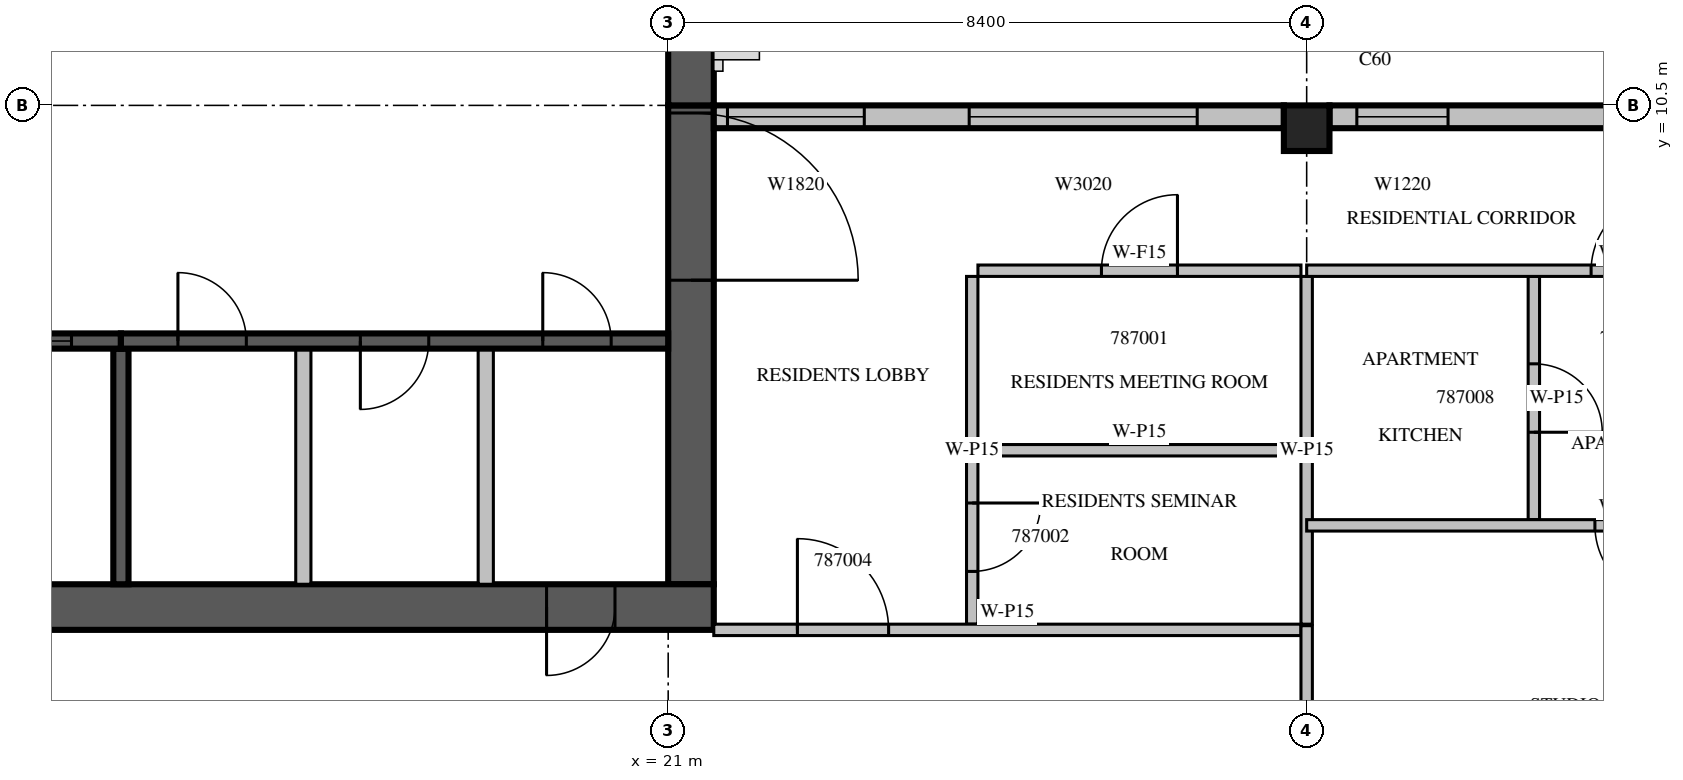
"""IFC4 building model, lengths in metres.
Left out: names, types, materials, properties, quantities, classifications, styles, units other than length and angle.
Written with IfcOpenShell. Run it as: python <this file> out.ifc"""

import sys

from ifc_helpers import new_model, si_unit, direction, frame, frame_2d, origin, origin_2d, place, context, subcontext, project, spatial, rectangle, extrude, source, transform, mapped, element, fill, save


model = new_model("IFC4")
c1 = context("Model", 3, precision=1e-05, world=origin(), true_north=direction((0.0, 1.0)))
c2 = subcontext(c1, "Body", "Model", "MODEL_VIEW")
j1 = project(units=[si_unit("LENGTHUNIT", "METRE"), si_unit("PLANEANGLEUNIT", "RADIAN")], contexts=[c1])
p1 = place(None, origin())
s1 = spatial("IfcSite", under=j1, at=p1, CompositionType="ELEMENT")
p2 = place(p1, origin())
s2 = spatial("IfcBuilding", under=s1, at=p2, CompositionType="ELEMENT")
p3 = place(p2, frame((0.0, 0.0, 365.0)))
s3 = spatial("IfcBuildingStorey", under=s2, at=p3, CompositionType="ELEMENT", Elevation=365.0)
m1 = source(origin(), c2, "Body", "SweptSolid", [
    extrude(rectangle(XDim=0.6, YDim=0.6, at=origin_2d()), origin(), (0.0, 0.0, 1.0), 3.5),
])
p4 = place(p3, frame((29.4, 10.2, 0.0), z_axis=(0.0, 0.0, 1.0), x_axis=(1.0, 0.0, 0.0)))
e1 = element("IfcColumn", 1, at=p4, inside=s3, PredefinedType="COLUMN", context=c2, shape_type="MappedRepresentation", body=[
    mapped(m1, transform((0.0, 0.0, 0.0), scale=1.0)),
])
m2 = source(origin(), c2, "Body", "SweptSolid", [
    extrude(rectangle(XDim=6.3, YDim=0.6, at=frame_2d((3.15, 0.0))), origin(), (0.0, 0.0, 1.0), 3.5),
])
p5 = place(p3, frame((21.3, 4.2, 0.0), z_axis=(0.0, 0.0, 1.0), x_axis=(0.0, 1.0, 0.0)))
e2 = element("IfcWall", 2, at=p5, inside=s3, PredefinedType="SHEAR", context=c2, shape_type="MappedRepresentation", body=[
    mapped(m2, transform((0.0, 0.0, 0.0), scale=1.0)),
])
m3 = source(origin(), c2, "Body", "SweptSolid", [
    extrude(rectangle(XDim=2.2, YDim=2.1, at=frame_2d((1.1, 1.05))), frame((0.0, 0.31, 0.0), z_axis=(0.0, -1.0, 0.0), x_axis=(1.0, 0.0, 0.0)), (0.0, 0.0, 1.0), 0.62),
])
p6 = place(p5, frame((4.0, 0.0, 0.0)))
e3 = element("IfcOpeningElement", 3, at=p6, cuts=e2, PredefinedType="OPENING", context=c2, shape_type="MappedRepresentation", body=[
    mapped(m3, transform((0.0, 0.0, 0.0), scale=1.0)),
])
m4 = source(origin(), c2, "Body", "SweptSolid", [
    extrude(rectangle(XDim=17.4, YDim=0.6, at=frame_2d((8.7, 0.0))), origin(), (0.0, 0.0, 1.0), 3.5),
])
p7 = place(p3, frame((4.2, 3.9, 0.0), z_axis=(0.0, 0.0, 1.0), x_axis=(1.0, 0.0, 0.0)))
e4 = element("IfcWall", 4, at=p7, inside=s3, PredefinedType="SHEAR", context=c2, shape_type="MappedRepresentation", body=[
    mapped(m4, transform((0.0, 0.0, 0.0), scale=1.0)),
])
m5 = source(origin(), c2, "Body", "SweptSolid", [
    extrude(rectangle(XDim=0.9, YDim=2.1, at=frame_2d((0.45, 1.05))), frame((0.0, 0.31, 0.0), z_axis=(0.0, -1.0, 0.0), x_axis=(1.0, 0.0, 0.0)), (0.0, 0.0, 1.0), 0.62),
])
p8 = place(p7, frame((15.2, 0.0, 0.0)))
e5 = element("IfcOpeningElement", 5, at=p8, cuts=e4, PredefinedType="OPENING", context=c2, shape_type="MappedRepresentation", body=[
    mapped(m5, transform((0.0, 0.0, 0.0), scale=1.0)),
])
m6 = source(origin(), c2, "Body", "SweptSolid", [
    extrude(rectangle(XDim=10.5, YDim=0.6, at=frame_2d((5.25, 0.0))), origin(), (0.0, 0.0, 1.0), 3.5),
])
p9 = place(p3, frame((21.3, 10.5, 0.0), z_axis=(0.0, 0.0, 1.0), x_axis=(0.0, 1.0, 0.0)))
e6 = element("IfcWall", 6, at=p9, inside=s3, PredefinedType="SHEAR", context=c2, shape_type="MappedRepresentation", body=[
    mapped(m6, transform((0.0, 0.0, 0.0), scale=1.0)),
])
m7 = source(origin(), c2, "Body", "SweptSolid", [
    extrude(rectangle(XDim=1.2, YDim=2.4, at=frame_2d((0.6, 1.2))), frame((0.0, 0.31, 0.0), z_axis=(0.0, -1.0, 0.0), x_axis=(1.0, 0.0, 0.0)), (0.0, 0.0, 1.0), 0.62),
])
p10 = place(p9, frame((5.7, 0.0, 0.6)))
e7 = element("IfcOpeningElement", 7, at=p10, cuts=e6, PredefinedType="OPENING", context=c2, shape_type="MappedRepresentation", body=[
    mapped(m7, transform((0.0, 0.0, 0.0), scale=1.0)),
])
m8 = source(origin(), c2, "Body", "SweptSolid", [
    extrude(rectangle(XDim=7.8, YDim=0.3, at=frame_2d((3.9, 0.0))), origin(), (0.0, 0.0, 1.0), 3.05),
])
p11 = place(p3, frame((37.5, 10.35, 0.0), z_axis=(0.0, 0.0, 1.0), x_axis=(-1.0, 0.0, 0.0)))
e8 = element("IfcWall", 8, at=p11, inside=s3, PredefinedType="STANDARD", context=c2, shape_type="MappedRepresentation", body=[
    mapped(m8, transform((0.0, 0.0, 0.0), scale=1.0)),
])
m9 = source(origin(), c2, "Body", "SweptSolid", [
    extrude(rectangle(XDim=3.0, YDim=2.0, at=frame_2d((1.5, 1.0))), frame((0.0, 0.16, 0.0), z_axis=(0.0, -1.0, 0.0), x_axis=(1.0, 0.0, 0.0)), (0.0, 0.0, 1.0), 0.32),
])
p12 = place(p11, frame((1.14, 0.0, 0.6)))
e9 = element("IfcOpeningElement", 9, at=p12, cuts=e8, PredefinedType="OPENING", context=c2, shape_type="MappedRepresentation", body=[
    mapped(m9, transform((0.0, 0.0, 0.0), scale=1.0)),
])
m10 = source(origin(), c2, "Body", "SweptSolid", [
    extrude(rectangle(XDim=1.2, YDim=2.0, at=frame_2d((0.6, 1.0))), frame((0.0, 0.16, 0.0), z_axis=(0.0, -1.0, 0.0), x_axis=(1.0, 0.0, 0.0)), (0.0, 0.0, 1.0), 0.32),
])
p13 = place(p11, frame((6.24, 0.0, 0.6)))
e10 = element("IfcOpeningElement", 10, at=p13, cuts=e8, PredefinedType="OPENING", context=c2, shape_type="MappedRepresentation", body=[
    mapped(m10, transform((0.0, 0.0, 0.0), scale=1.0)),
])
p14 = place(p3, frame((29.1, 10.35, 0.0), z_axis=(0.0, 0.0, 1.0), x_axis=(-1.0, 0.0, 0.0)))
e11 = element("IfcWall", 11, at=p14, inside=s3, PredefinedType="STANDARD", context=c2, shape_type="SweptSolid", body=[
    extrude(rectangle(XDim=7.5, YDim=0.3, at=frame_2d((3.75, 0.0))), origin(), (0.0, 0.0, 1.0), 3.05),
])
p15 = place(p14, frame((1.14, 0.0, 0.6)))
e12 = element("IfcOpeningElement", 12, at=p15, cuts=e11, PredefinedType="OPENING", context=c2, shape_type="MappedRepresentation", body=[
    mapped(m9, transform((0.0, 0.0, 0.0), scale=1.0)),
])
m11 = source(origin(), c2, "Body", "SweptSolid", [
    extrude(rectangle(XDim=1.8, YDim=2.0, at=frame_2d((0.9, 1.0))), frame((0.0, 0.16, 0.0), z_axis=(0.0, -1.0, 0.0), x_axis=(1.0, 0.0, 0.0)), (0.0, 0.0, 1.0), 0.32),
])
p16 = place(p14, frame((5.52, 0.0, 0.6)))
e13 = element("IfcOpeningElement", 13, at=p16, cuts=e11, PredefinedType="OPENING", context=c2, shape_type="MappedRepresentation", body=[
    mapped(m11, transform((0.0, 0.0, 0.0), scale=1.0)),
])
p17 = place(p3, frame((13.8, 4.2, 0.0), z_axis=(0.0, 0.0, 1.0), x_axis=(0.0, 1.0, 0.0)))
e14 = element("IfcWall", 14, at=p17, inside=s3, PredefinedType="SOLIDWALL", context=c2, shape_type="SweptSolid", body=[
    extrude(rectangle(XDim=3.1, YDim=0.2, at=frame_2d((1.55, 0.0))), origin(), (0.0, 0.0, 1.0), 3.05),
])
p18 = place(p3, frame((16.2, 4.2, 0.0), z_axis=(0.0, 0.0, 1.0), x_axis=(0.0, 1.0, 0.0)))
e15 = element("IfcWall", 15, at=p18, inside=s3, PredefinedType="PARTITIONING", context=c2, shape_type="SweptSolid", body=[
    extrude(rectangle(XDim=3.1, YDim=0.2, at=frame_2d((1.55, 0.0))), origin(), (0.0, 0.0, 1.0), 3.05),
])
m12 = source(origin(), c2, "Body", "SweptSolid", [
    extrude(rectangle(XDim=3.1, YDim=0.2, at=frame_2d((1.55, 0.0))), origin(), (0.0, 0.0, 1.0), 3.05),
])
p19 = place(p3, frame((18.6, 4.2, 0.0), z_axis=(0.0, 0.0, 1.0), x_axis=(0.0, 1.0, 0.0)))
e16 = element("IfcWall", 16, at=p19, inside=s3, PredefinedType="PARTITIONING", context=c2, shape_type="MappedRepresentation", body=[
    mapped(m12, transform((0.0, 0.0, 0.0), scale=1.0)),
])
m13 = source(origin(), c2, "Body", "SweptSolid", [
    extrude(rectangle(XDim=9.6, YDim=0.2, at=frame_2d((4.8, 0.0))), origin(), (0.0, 0.0, 1.0), 3.5),
])
p20 = place(p3, frame((4.2, 7.4, 0.0), z_axis=(0.0, 0.0, 1.0), x_axis=(1.0, 0.0, 0.0)))
e17 = element("IfcWall", 17, at=p20, inside=s3, PredefinedType="SOLIDWALL", context=c2, shape_type="MappedRepresentation", body=[
    mapped(m13, transform((0.0, 0.0, 0.0), scale=1.0)),
])
m14 = source(origin(), c2, "Body", "SweptSolid", [
    extrude(rectangle(XDim=1.1, YDim=2.1, at=frame_2d((0.55, 1.05))), frame((0.0, 0.11, 0.0), z_axis=(0.0, -1.0, 0.0), x_axis=(1.0, 0.0, 0.0)), (0.0, 0.0, 1.0), 0.22),
])
p21 = place(p20, frame((0.65, 0.0, 0.0)))
e18 = element("IfcOpeningElement", 18, at=p21, cuts=e17, PredefinedType="OPENING", context=c2, shape_type="MappedRepresentation", body=[
    mapped(m14, transform((0.0, 0.0, 0.0), scale=1.0)),
])
p22 = place(p20, frame((3.05, 0.0, 0.0)))
e19 = element("IfcOpeningElement", 19, at=p22, cuts=e17, PredefinedType="OPENING", context=c2, shape_type="MappedRepresentation", body=[
    mapped(m14, transform((0.0, 0.0, 0.0), scale=1.0)),
])
p23 = place(p20, frame((5.45, 0.0, 0.0)))
e20 = element("IfcOpeningElement", 20, at=p23, cuts=e17, PredefinedType="OPENING", context=c2, shape_type="MappedRepresentation", body=[
    mapped(m14, transform((0.0, 0.0, 0.0), scale=1.0)),
])
p24 = place(p20, frame((7.85, 0.0, 0.0)))
e21 = element("IfcOpeningElement", 21, at=p24, cuts=e17, PredefinedType="OPENING", context=c2, shape_type="MappedRepresentation", body=[
    mapped(m14, transform((0.0, 0.0, 0.0), scale=1.0)),
])
p25 = place(p3, frame((13.8, 7.4, 0.0), z_axis=(0.0, 0.0, 1.0), x_axis=(1.0, 0.0, 0.0)))
e22 = element("IfcWall", 22, at=p25, inside=s3, PredefinedType="SOLIDWALL", context=c2, shape_type="SweptSolid", body=[
    extrude(rectangle(XDim=7.2, YDim=0.2, at=frame_2d((3.6, 0.0))), origin(), (0.0, 0.0, 1.0), 3.05),
])
m15 = source(origin(), c2, "Body", "SweptSolid", [
    extrude(rectangle(XDim=0.9, YDim=2.1, at=frame_2d((0.45, 1.05))), frame((0.0, 0.11, 0.0), z_axis=(0.0, -1.0, 0.0), x_axis=(1.0, 0.0, 0.0)), (0.0, 0.0, 1.0), 0.22),
])
p26 = place(p25, frame((0.75, 0.0, 0.0)))
e23 = element("IfcOpeningElement", 23, at=p26, cuts=e22, PredefinedType="OPENING", context=c2, shape_type="MappedRepresentation", body=[
    mapped(m15, transform((0.0, 0.0, 0.0), scale=1.0)),
])
p27 = place(p25, frame((3.15, 0.0, 0.0)))
e24 = element("IfcOpeningElement", 24, at=p27, cuts=e22, PredefinedType="OPENING", context=c2, shape_type="MappedRepresentation", body=[
    mapped(m15, transform((0.0, 0.0, 0.0), scale=1.0)),
])
p28 = place(p25, frame((5.55, 0.0, 0.0)))
e25 = element("IfcOpeningElement", 25, at=p28, cuts=e22, PredefinedType="OPENING", context=c2, shape_type="MappedRepresentation", body=[
    mapped(m15, transform((0.0, 0.0, 0.0), scale=1.0)),
])
p29 = place(p3, frame((25.0, 8.25, 0.0), z_axis=(0.0, 0.0, 1.0), x_axis=(0.0, -1.0, 0.0)))
e26 = element("IfcWall", 26, at=p29, inside=s3, PredefinedType="PARTITIONING", context=c2, shape_type="SweptSolid", body=[
    extrude(rectangle(XDim=4.575, YDim=0.15, at=frame_2d((2.288, 0.0))), origin(), (0.0, 0.0, 1.0), 3.05),
])
m16 = source(origin(), c2, "Body", "SweptSolid", [
    extrude(rectangle(XDim=0.9, YDim=2.1, at=frame_2d((0.45, 1.05))), frame((0.0, 0.085, 0.0), z_axis=(0.0, -1.0, 0.0), x_axis=(1.0, 0.0, 0.0)), (0.0, 0.0, 1.0), 0.17),
])
p30 = place(p29, frame((2.981, 0.0, 0.0)))
e27 = element("IfcOpeningElement", 27, at=p30, cuts=e26, PredefinedType="OPENING", context=c2, shape_type="MappedRepresentation", body=[
    mapped(m16, transform((0.0, 0.0, 0.0), scale=1.0)),
])
m17 = source(origin(), c2, "Body", "SweptSolid", [
    extrude(rectangle(XDim=4.575, YDim=0.15, at=frame_2d((2.288, 0.0))), origin(), (0.0, 0.0, 1.0), 3.05),
])
p31 = place(p3, frame((29.4, 3.675, 0.0), z_axis=(0.0, 0.0, 1.0), x_axis=(0.0, 1.0, 0.0)))
e28 = element("IfcWall", 28, at=p31, inside=s3, PredefinedType="PARTITIONING", context=c2, shape_type="MappedRepresentation", body=[
    mapped(m17, transform((0.0, 0.0, 0.0), scale=1.0)),
])
p32 = place(p3, frame((29.325, 8.325, 0.0), z_axis=(0.0, 0.0, 1.0), x_axis=(-1.0, 0.0, 0.0)))
e29 = element("IfcWall", 29, at=p32, inside=s3, PredefinedType="PARTITIONING", context=c2, shape_type="SweptSolid", body=[
    extrude(rectangle(XDim=4.25, YDim=0.15, at=frame_2d((2.125, 0.0))), origin(), (0.0, 0.0, 1.0), 3.05),
])
m18 = source(origin(), c2, "Body", "SweptSolid", [
    extrude(rectangle(XDim=1.0, YDim=2.1, at=frame_2d((0.5, 1.05))), frame((0.0, 0.085, 0.0), z_axis=(0.0, -1.0, 0.0), x_axis=(1.0, 0.0, 0.0)), (0.0, 0.0, 1.0), 0.17),
])
p33 = place(p32, frame((1.625, 0.0, 0.0)))
e30 = element("IfcOpeningElement", 30, at=p33, cuts=e29, PredefinedType="OPENING", context=c2, shape_type="MappedRepresentation", body=[
    mapped(m18, transform((0.0, 0.0, 0.0), scale=1.0)),
])
m19 = source(origin(), c2, "Body", "SweptSolid", [
    extrude(rectangle(XDim=4.25, YDim=0.15, at=frame_2d((2.125, 0.0))), origin(), (0.0, 0.0, 1.0), 3.05),
])
p34 = place(p3, frame((29.325, 5.963, 0.0), z_axis=(0.0, 0.0, 1.0), x_axis=(-1.0, 0.0, 0.0)))
e31 = element("IfcWall", 31, at=p34, inside=s3, PredefinedType="PARTITIONING", context=c2, shape_type="MappedRepresentation", body=[
    mapped(m19, transform((0.0, 0.0, 0.0), scale=1.0)),
])
p35 = place(p3, frame((21.6, 3.6, 0.0), z_axis=(0.0, 0.0, 1.0), x_axis=(1.0, 0.0, 0.0)))
e32 = element("IfcWall", 32, at=p35, inside=s3, PredefinedType="PARTITIONING", context=c2, shape_type="SweptSolid", body=[
    extrude(rectangle(XDim=7.725, YDim=0.15, at=frame_2d((3.862, 0.0))), origin(), (0.0, 0.0, 1.0), 3.05),
])
m20 = source(origin(), c2, "Body", "SweptSolid", [
    extrude(rectangle(XDim=1.2, YDim=2.1, at=frame_2d((0.6, 1.05))), frame((0.0, 0.085, 0.0), z_axis=(0.0, -1.0, 0.0), x_axis=(1.0, 0.0, 0.0)), (0.0, 0.0, 1.0), 0.17),
])
p36 = place(p35, frame((1.1, 0.0, 0.0)))
e33 = element("IfcOpeningElement", 33, at=p36, cuts=e32, PredefinedType="OPENING", context=c2, shape_type="MappedRepresentation", body=[
    mapped(m20, transform((0.0, 0.0, 0.0), scale=1.0)),
])
p37 = place(p3, frame((32.389, 5.05, 0.0), z_axis=(0.0, 0.0, 1.0), x_axis=(0.0, 1.0, 0.0)))
e34 = element("IfcWall", 34, at=p37, inside=s3, PredefinedType="PARTITIONING", context=c2, shape_type="SweptSolid", body=[
    extrude(rectangle(XDim=3.2, YDim=0.15, at=frame_2d((1.6, 0.0))), origin(), (0.0, 0.0, 1.0), 3.05),
])
p38 = place(p37, frame((1.15, 0.0, 0.0)))
e35 = element("IfcOpeningElement", 35, at=p38, cuts=e34, PredefinedType="OPENING", context=c2, shape_type="MappedRepresentation", body=[
    mapped(m16, transform((0.0, 0.0, 0.0), scale=1.0)),
])
p39 = place(p3, frame((29.4, 0.599, 0.0), z_axis=(0.0, 0.0, 1.0), x_axis=(0.0, 1.0, 0.0)))
e36 = element("IfcWall", 36, at=p39, inside=s3, PredefinedType="PARTITIONING", context=c2, shape_type="SweptSolid", body=[
    extrude(rectangle(XDim=3.056, YDim=0.15, at=frame_2d((1.528, 0.0))), origin(), (0.0, 0.0, 1.0), 3.05),
])
p40 = place(p3, frame((37.8, 4.975, 0.0), z_axis=(0.0, 0.0, 1.0), x_axis=(-1.0, 0.0, 0.0)))
e37 = element("IfcWall", 37, at=p40, inside=s3, PredefinedType="PARTITIONING", context=c2, shape_type="SweptSolid", body=[
    extrude(rectangle(XDim=8.4, YDim=0.15, at=frame_2d((4.2, 0.0))), origin(), (0.0, 0.0, 1.0), 3.05),
])
p41 = place(p40, frame((3.608, 0.0, 0.0)))
e38 = element("IfcOpeningElement", 38, at=p41, cuts=e37, PredefinedType="OPENING", context=c2, shape_type="MappedRepresentation", body=[
    mapped(m18, transform((0.0, 0.0, 0.0), scale=1.0)),
])
m21 = source(origin(), c2, "Body", "SweptSolid", [
    extrude(rectangle(XDim=8.4, YDim=0.15, at=frame_2d((4.2, 0.0))), origin(), (0.0, 0.0, 1.0), 3.05),
])
p42 = place(p3, frame((37.8, 8.325, 0.0), z_axis=(0.0, 0.0, 1.0), x_axis=(-1.0, 0.0, 0.0)))
e39 = element("IfcWall", 39, at=p42, inside=s3, PredefinedType="PARTITIONING", context=c2, shape_type="MappedRepresentation", body=[
    mapped(m21, transform((0.0, 0.0, 0.0), scale=1.0)),
])
p43 = place(p42, frame((3.658, 0.0, 0.0)))
e40 = element("IfcOpeningElement", 40, at=p43, cuts=e39, PredefinedType="OPENING", context=c2, shape_type="MappedRepresentation", body=[
    mapped(m18, transform((0.0, 0.0, 0.0), scale=1.0)),
])
m22 = source(origin(), c2, "Body", "SweptSolid", [
    extrude(rectangle(XDim=1.2, YDim=2.0, at=frame_2d((0.6, 1.0))), frame((0.0, 0.03, 0.0), z_axis=(0.0, -1.0, 0.0), x_axis=(1.0, 0.0, 0.0)), (0.0, 0.0, 1.0), 0.06),
])
p44 = place(p13, origin())
e41 = element("IfcWindow", 41, at=p44, inside=s3, PartitioningType="SINGLE_PANEL", PredefinedType="WINDOW", context=c2, shape_type="MappedRepresentation", body=[
    mapped(m22, transform((0.0, 0.0, 0.0), scale=1.0)),
])
fill(e10, e41)
m23 = source(origin(), c2, "Body", "SweptSolid", [
    extrude(rectangle(XDim=3.0, YDim=2.0, at=frame_2d((1.5, 1.0))), frame((0.0, 0.03, 0.0), z_axis=(0.0, -1.0, 0.0), x_axis=(1.0, 0.0, 0.0)), (0.0, 0.0, 1.0), 0.06),
])
p45 = place(p15, origin())
e42 = element("IfcWindow", 42, at=p45, inside=s3, PartitioningType="SINGLE_PANEL", PredefinedType="WINDOW", context=c2, shape_type="MappedRepresentation", body=[
    mapped(m23, transform((0.0, 0.0, 0.0), scale=1.0)),
])
fill(e12, e42)
m24 = source(origin(), c2, "Body", "SweptSolid", [
    extrude(rectangle(XDim=1.8, YDim=2.0, at=frame_2d((0.9, 1.0))), frame((0.0, 0.03, 0.0), z_axis=(0.0, -1.0, 0.0), x_axis=(1.0, 0.0, 0.0)), (0.0, 0.0, 1.0), 0.06),
])
p46 = place(p16, origin())
e43 = element("IfcWindow", 43, at=p46, inside=s3, PartitioningType="SINGLE_PANEL", PredefinedType="WINDOW", context=c2, shape_type="MappedRepresentation", body=[
    mapped(m24, transform((0.0, 0.0, 0.0), scale=1.0)),
])
fill(e13, e43)
m25 = source(origin(), c2, "Body", "SweptSolid", [
    extrude(rectangle(XDim=1.1, YDim=2.1, at=frame_2d((0.55, 1.05))), frame((0.0, 0.025, 0.0), z_axis=(0.0, -1.0, 0.0), x_axis=(1.0, 0.0, 0.0)), (0.0, 0.0, 1.0), 0.05),
])
p47 = place(p24, origin())
e44 = element("IfcDoor", 44, at=p47, inside=s3, OperationType="SLIDING_TO_LEFT", PredefinedType="DOOR", context=c2, shape_type="MappedRepresentation", body=[
    mapped(m25, transform((0.0, 0.0, 0.0), scale=1.0)),
])
fill(e21, e44)
m26 = source(origin(), c2, "Body", "SweptSolid", [
    extrude(rectangle(XDim=0.9, YDim=2.1, at=frame_2d((0.45, 1.05))), frame((0.0, 0.025, 0.0), z_axis=(0.0, -1.0, 0.0), x_axis=(1.0, 0.0, 0.0)), (0.0, 0.0, 1.0), 0.05),
])
p48 = place(p26, origin())
e45 = element("IfcDoor", 45, at=p48, inside=s3, OperationType="SINGLE_SWING_LEFT", PredefinedType="DOOR", context=c2, shape_type="MappedRepresentation", body=[
    mapped(m26, transform((0.0, 0.0, 0.0), scale=1.0)),
])
fill(e23, e45)
p49 = place(p27, origin())
e46 = element("IfcDoor", 46, at=p49, inside=s3, OperationType="SINGLE_SWING_RIGHT", PredefinedType="DOOR", context=c2, shape_type="MappedRepresentation", body=[
    mapped(m26, transform((0.0, 0.0, 0.0), scale=1.0)),
])
fill(e24, e46)
p50 = place(p28, origin())
e47 = element("IfcDoor", 47, at=p50, inside=s3, OperationType="SINGLE_SWING_LEFT", PredefinedType="DOOR", context=c2, shape_type="MappedRepresentation", body=[
    mapped(m26, transform((0.0, 0.0, 0.0), scale=1.0)),
])
fill(e25, e47)
m27 = source(origin(), c2, "Body", "SweptSolid", [
    extrude(rectangle(XDim=2.2, YDim=2.1, at=frame_2d((1.1, 1.05))), frame((0.0, 0.025, 0.0), z_axis=(0.0, -1.0, 0.0), x_axis=(1.0, 0.0, 0.0)), (0.0, 0.0, 1.0), 0.05),
])
p51 = place(p6, origin())
e48 = element("IfcDoor", 48, at=p51, inside=s3, OperationType="DOUBLE_DOOR_SINGLE_SWING", PredefinedType="DOOR", context=c2, shape_type="MappedRepresentation", body=[
    mapped(m27, transform((0.0, 0.0, 0.0), scale=1.0)),
])
fill(e3, e48)
p52 = place(p8, origin())
e49 = element("IfcDoor", 49, at=p52, inside=s3, OperationType="SINGLE_SWING_RIGHT", PredefinedType="DOOR", context=c2, shape_type="MappedRepresentation", body=[
    mapped(m26, transform((0.0, 0.0, 0.0), scale=1.0)),
])
fill(e5, e49)
m28 = source(origin(), c2, "Body", "SweptSolid", [
    extrude(rectangle(XDim=1.0, YDim=2.1, at=frame_2d((0.5, 1.05))), frame((0.0, 0.025, 0.0), z_axis=(0.0, -1.0, 0.0), x_axis=(1.0, 0.0, 0.0)), (0.0, 0.0, 1.0), 0.05),
])
p53 = place(p33, origin())
e50 = element("IfcDoor", 50, at=p53, inside=s3, OperationType="SINGLE_SWING_RIGHT", PredefinedType="DOOR", context=c2, shape_type="MappedRepresentation", body=[
    mapped(m28, transform((0.0, 0.0, 0.0), scale=1.0)),
])
fill(e30, e50)
p54 = place(p30, origin())
e51 = element("IfcDoor", 51, at=p54, inside=s3, OperationType="SINGLE_SWING_LEFT", PredefinedType="DOOR", context=c2, shape_type="MappedRepresentation", body=[
    mapped(m26, transform((0.0, 0.0, 0.0), scale=1.0)),
])
fill(e27, e51)
m29 = source(origin(), c2, "Body", "SweptSolid", [
    extrude(rectangle(XDim=1.2, YDim=2.1, at=frame_2d((0.6, 1.05))), frame((0.0, 0.025, 0.0), z_axis=(0.0, -1.0, 0.0), x_axis=(1.0, 0.0, 0.0)), (0.0, 0.0, 1.0), 0.05),
])
p55 = place(p36, origin())
e52 = element("IfcDoor", 52, at=p55, inside=s3, OperationType="SINGLE_SWING_LEFT", PredefinedType="DOOR", context=c2, shape_type="MappedRepresentation", body=[
    mapped(m29, transform((0.0, 0.0, 0.0), scale=1.0)),
])
fill(e33, e52)
p56 = place(p43, origin())
e53 = element("IfcDoor", 53, at=p56, inside=s3, OperationType="SINGLE_SWING_RIGHT", PredefinedType="DOOR", context=c2, shape_type="MappedRepresentation", body=[
    mapped(m28, transform((0.0, 0.0, 0.0), scale=1.0)),
])
fill(e40, e53)
p57 = place(p41, origin())
e54 = element("IfcDoor", 54, at=p57, inside=s3, OperationType="SINGLE_SWING_LEFT", PredefinedType="DOOR", context=c2, shape_type="MappedRepresentation", body=[
    mapped(m28, transform((0.0, 0.0, 0.0), scale=1.0)),
])
fill(e38, e54)
p58 = place(p38, origin())
e55 = element("IfcDoor", 55, at=p58, inside=s3, OperationType="SINGLE_SWING_RIGHT", PredefinedType="DOOR", context=c2, shape_type="MappedRepresentation", body=[
    mapped(m26, transform((0.0, 0.0, 0.0), scale=1.0)),
])
fill(e35, e55)
save(model, sys.argv[1])
